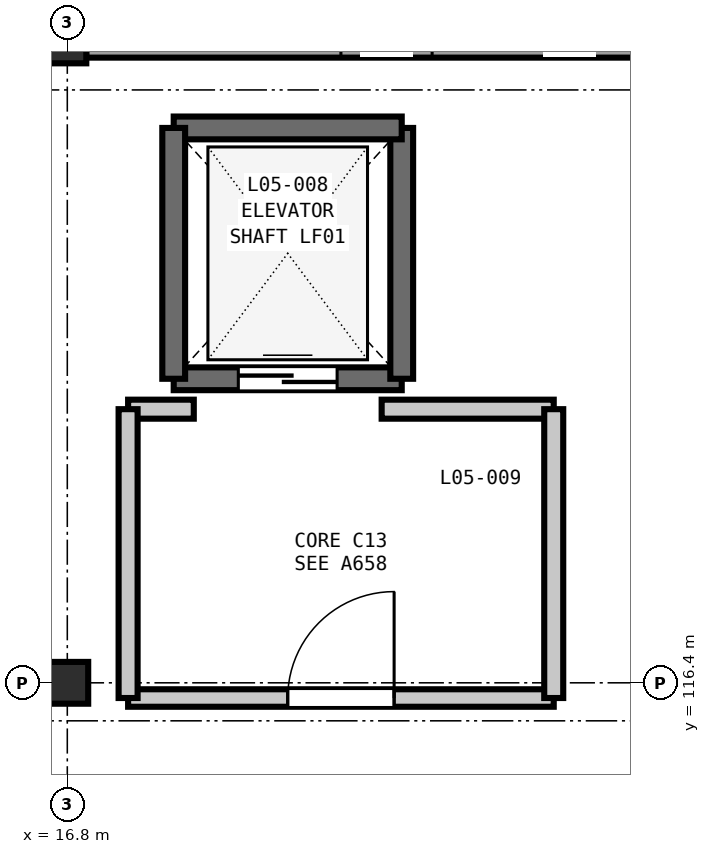
"""IFC4 building model, lengths in metres.
Left out: names, types, materials, properties, quantities, classifications, styles, units other than length and angle.
Written with IfcOpenShell. Run it as: python <this file> out.ifc"""

import sys

from ifc_helpers import new_model, si_unit, direction, frame, frame_2d, origin, origin_2d, place, context, subcontext, project, spatial, rectangle, extrude, element, fill, save


model = new_model("IFC4")
c1 = context("Model", 3, precision=1e-05, world=origin(), true_north=direction((0.0, 1.0)))
c2 = subcontext(c1, "Body", "Model", "MODEL_VIEW")
j1 = project(units=[si_unit("LENGTHUNIT", "METRE"), si_unit("PLANEANGLEUNIT", "RADIAN")], contexts=[c1])
p1 = place(None, origin())
s1 = spatial("IfcSite", under=j1, at=p1, CompositionType="ELEMENT")
p2 = place(p1, origin())
s2 = spatial("IfcBuilding", under=s1, at=p2, CompositionType="ELEMENT")
p3 = place(p2, frame((0.0, 0.0, 24.6)))
s3 = spatial("IfcBuildingStorey", under=s2, at=p3, CompositionType="ELEMENT", Elevation=24.6)
p4 = place(p3, frame((16.8, 116.4, 0.0), z_axis=(0.0, 0.0, 1.0), x_axis=(1.0, 0.0, 0.0)))
e1 = element("IfcColumn", 1, at=p4, inside=s3, PredefinedType="COLUMN", context=c2, shape_type="SweptSolid", body=[
    extrude(rectangle(XDim=0.55, YDim=0.55, at=origin_2d()), origin(), (0.0, 0.0, 1.0), 4.2),
])
p5 = place(p3, frame((16.8, 124.8, 0.0), z_axis=(0.0, 0.0, 1.0), x_axis=(1.0, 0.0, 0.0)))
e2 = element("IfcColumn", 2, at=p5, inside=s3, PredefinedType="COLUMN", context=c2, shape_type="SweptSolid", body=[
    extrude(rectangle(XDim=0.5, YDim=0.5, at=origin_2d()), origin(), (0.0, 0.0, 1.0), 4.2),
])
p6 = place(p3, frame((17.048, 124.8, 0.0), z_axis=(0.0, 0.0, 1.0), x_axis=(1.0, 0.0, 0.0)))
e3 = element("IfcWall", 3, at=p6, inside=s3, PredefinedType="SOLIDWALL", context=c2, shape_type="SweptSolid", body=[
    extrude(rectangle(XDim=7.904, YDim=0.35, at=frame_2d((3.952, 0.0))), origin(), (0.0, 0.0, 1.0), 3.48),
])
p7 = place(p6, frame((3.352, 0.0, 0.9)))
e4 = element("IfcOpeningElement", 4, at=p7, cuts=e3, PredefinedType="OPENING", context=c2, shape_type="SweptSolid", body=[
    extrude(rectangle(XDim=1.2, YDim=1.55, at=frame_2d((0.6, 0.775))), frame((0.0, 0.185, 0.0), z_axis=(0.0, -1.0, 0.0), x_axis=(1.0, 0.0, 0.0)), (0.0, 0.0, 1.0), 0.37),
])
p8 = place(p3, frame((18.2, 120.4, 0.0), z_axis=(0.0, 0.0, 1.0), x_axis=(1.0, 0.0, 0.0)))
e5 = element("IfcWall", 5, at=p8, inside=s3, PredefinedType="SHEAR", context=c2, shape_type="SweptSolid", body=[
    extrude(rectangle(XDim=3.0, YDim=0.3, at=frame_2d((1.5, 0.0))), origin(), (0.0, 0.0, 1.0), 4.2),
])
p9 = place(p8, frame((0.85, 0.0, 0.0)))
e6 = element("IfcOpeningElement", 6, at=p9, cuts=e5, PredefinedType="OPENING", context=c2, shape_type="SweptSolid", body=[
    extrude(rectangle(XDim=1.3, YDim=2.2, at=frame_2d((0.65, 1.1))), frame((0.0, 0.16, 0.0), z_axis=(0.0, -1.0, 0.0), x_axis=(1.0, 0.0, 0.0)), (0.0, 0.0, 1.0), 0.32),
])
p10 = place(p3, frame((21.2, 120.4, 0.0), z_axis=(0.0, 0.0, 1.0), x_axis=(0.0, 1.0, 0.0)))
e7 = element("IfcWall", 7, at=p10, inside=s3, PredefinedType="SHEAR", context=c2, shape_type="SweptSolid", body=[
    extrude(rectangle(XDim=3.3, YDim=0.3, at=frame_2d((1.65, 0.0))), origin(), (0.0, 0.0, 1.0), 4.2),
])
p11 = place(p3, frame((21.2, 123.7, 0.0), z_axis=(0.0, 0.0, 1.0), x_axis=(-1.0, 0.0, 0.0)))
e8 = element("IfcWall", 8, at=p11, inside=s3, PredefinedType="SHEAR", context=c2, shape_type="SweptSolid", body=[
    extrude(rectangle(XDim=3.0, YDim=0.3, at=frame_2d((1.5, 0.0))), origin(), (0.0, 0.0, 1.0), 4.2),
])
p12 = place(p3, frame((18.2, 123.7, 0.0), z_axis=(0.0, 0.0, 1.0), x_axis=(0.0, -1.0, 0.0)))
e9 = element("IfcWall", 9, at=p12, inside=s3, PredefinedType="SHEAR", context=c2, shape_type="SweptSolid", body=[
    extrude(rectangle(XDim=3.3, YDim=0.3, at=frame_2d((1.65, 0.0))), origin(), (0.0, 0.0, 1.0), 4.2),
])
p13 = place(p3, frame((17.6, 116.2, 0.0), z_axis=(0.0, 0.0, 1.0), x_axis=(1.0, 0.0, 0.0)))
e10 = element("IfcWall", 10, at=p13, inside=s3, PredefinedType="PARTITIONING", context=c2, shape_type="SweptSolid", body=[
    extrude(rectangle(XDim=5.6, YDim=0.23, at=frame_2d((2.8, 0.0))), origin(), (0.0, 0.0, 1.0), 3.585),
])
p14 = place(p13, frame((2.1, 0.0, 0.0)))
e11 = element("IfcOpeningElement", 11, at=p14, cuts=e10, PredefinedType="OPENING", context=c2, shape_type="SweptSolid", body=[
    extrude(rectangle(XDim=1.4, YDim=2.2, at=frame_2d((0.7, 1.1))), frame((0.0, 0.125, 0.0), z_axis=(0.0, -1.0, 0.0), x_axis=(1.0, 0.0, 0.0)), (0.0, 0.0, 1.0), 0.25),
])
p15 = place(p3, frame((20.936, 120.0, 0.0), z_axis=(0.0, 0.0, 1.0), x_axis=(1.0, 0.0, 0.0)))
e12 = element("IfcWall", 12, at=p15, inside=s3, PredefinedType="PARTITIONING", context=c2, shape_type="SweptSolid", body=[
    extrude(rectangle(XDim=2.264, YDim=0.25, at=frame_2d((1.132, 0.0))), origin(), (0.0, 0.0, 1.0), 3.92),
])
p16 = place(p3, frame((17.6, 120.0, 0.0), z_axis=(0.0, 0.0, 1.0), x_axis=(1.0, 0.0, 0.0)))
e13 = element("IfcWall", 13, at=p16, inside=s3, PredefinedType="PARTITIONING", context=c2, shape_type="SweptSolid", body=[
    extrude(rectangle(XDim=0.864, YDim=0.25, at=frame_2d((0.432, 0.0))), origin(), (0.0, 0.0, 1.0), 3.92),
])
for number, where, z_axis, x_axis in (
    (14, (17.6, 116.2, 0.0), (0.0, 0.0, 1.0), (0.0, 1.0, 0.0)),
    (15, (23.2, 116.2, 0.0), (0.0, 0.0, 1.0), (0.0, 1.0, 0.0)),
):
    element("IfcWall", number, at=place(p3, frame(where, z_axis=z_axis, x_axis=x_axis)), inside=s3, PredefinedType="PARTITIONING", context=c2, shape_type="SweptSolid", body=[
        extrude(rectangle(XDim=3.8, YDim=0.25, at=frame_2d((1.9, 0.0))), origin(), (0.0, 0.0, 1.0), 3.92),
    ])
p17 = place(p9, origin())
e16 = element("IfcDoor", 16, at=p17, inside=s3, OperationType="DOUBLE_DOOR_SLIDING", PredefinedType="DOOR", context=c2, shape_type="SweptSolid", body=[
    extrude(rectangle(XDim=1.3, YDim=2.2, at=frame_2d((0.65, 1.1))), frame((0.0, 0.025, 0.0), z_axis=(0.0, -1.0, 0.0), x_axis=(1.0, 0.0, 0.0)), (0.0, 0.0, 1.0), 0.05),
])
fill(e6, e16)
p18 = place(p14, origin())
e17 = element("IfcDoor", 17, at=p18, inside=s3, OperationType="SINGLE_SWING_RIGHT", PredefinedType="DOOR", context=c2, shape_type="SweptSolid", body=[
    extrude(rectangle(XDim=1.4, YDim=2.2, at=frame_2d((0.7, 1.1))), frame((0.0, 0.025, 0.0), z_axis=(0.0, -1.0, 0.0), x_axis=(1.0, 0.0, 0.0)), (0.0, 0.0, 1.0), 0.05),
])
fill(e11, e17)
save(model, sys.argv[1])
